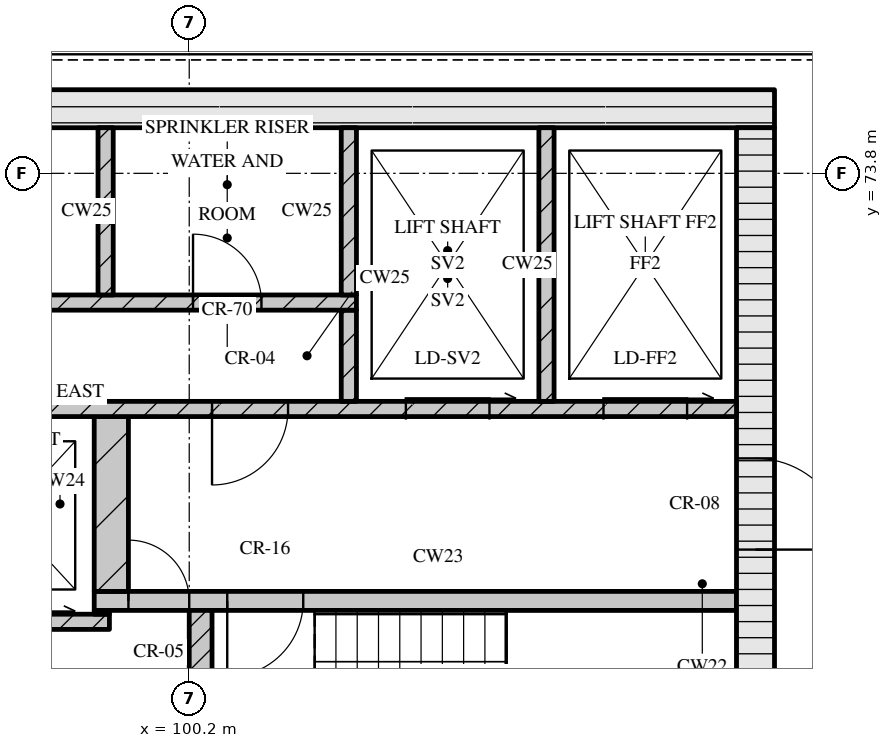
"""IFC4 building model, lengths in metres.
Left out: names, types, materials, properties, quantities, classifications, styles, units other than length and angle.
Written with IfcOpenShell. Run it as: python <this file> out.ifc"""

import sys

from ifc_helpers import new_model, si_unit, direction, frame, frame_2d, origin, place, context, subcontext, project, spatial, rectangle, extrude, element, fill, save


model = new_model("IFC4")
c1 = context("Model", 3, precision=1e-05, world=origin(), true_north=direction((0.0, 1.0)))
c2 = subcontext(c1, "Body", "Model", "MODEL_VIEW")
j1 = project(units=[si_unit("LENGTHUNIT", "METRE"), si_unit("PLANEANGLEUNIT", "RADIAN")], contexts=[c1])
p1 = place(None, origin())
s1 = spatial("IfcSite", under=j1, at=p1, CompositionType="ELEMENT")
p2 = place(p1, origin())
s2 = spatial("IfcBuilding", under=s1, at=p2, CompositionType="ELEMENT")
p3 = place(p2, frame((0.0, 0.0, 263.55)))
s3 = spatial("IfcBuildingStorey", under=s2, at=p3, CompositionType="ELEMENT", Elevation=263.55)
p4 = place(p3, frame((67.3, 74.65, 0.0), z_axis=(0.0, 0.0, 1.0), x_axis=(1.0, 0.0, 0.0)))
e1 = element("IfcWall", 1, at=p4, inside=s3, PredefinedType="SOLIDWALL", context=c2, shape_type="SweptSolid", body=[
    extrude(rectangle(XDim=40.6, YDim=0.5, at=frame_2d((20.3, 0.0))), origin(), (0.0, 0.0, 1.0), 3.32),
])
p5 = place(p3, frame((107.65, 62.4, 0.0), z_axis=(0.0, 0.0, 1.0), x_axis=(0.0, 1.0, 0.0)))
e2 = element("IfcWall", 2, at=p5, inside=s3, PredefinedType="SOLIDWALL", context=c2, shape_type="SweptSolid", body=[
    extrude(rectangle(XDim=12.0, YDim=0.5, at=frame_2d((6.0, 0.0))), origin(), (0.0, 0.0, 1.0), 3.32),
])
p6 = place(p5, frame((6.45, 0.0, 0.0)))
e3 = element("IfcOpeningElement", 3, at=p6, cuts=e2, PredefinedType="OPENING", context=c2, shape_type="SweptSolid", body=[
    extrude(rectangle(XDim=1.2, YDim=2.1, at=frame_2d((0.6, 1.05))), frame((0.0, 0.26, 0.0), z_axis=(0.0, -1.0, 0.0), x_axis=(1.0, 0.0, 0.0)), (0.0, 0.0, 1.0), 0.52),
])
p7 = place(p3, frame((100.35, 65.2, 0.0), z_axis=(0.0, 0.0, 1.0), x_axis=(0.0, 1.0, 0.0)))
e4 = element("IfcWall", 4, at=p7, inside=s3, PredefinedType="SOLIDWALL", context=c2, shape_type="SweptSolid", body=[
    extrude(rectangle(XDim=2.85, YDim=0.3, at=frame_2d((1.425, 0.0))), origin(), (0.0, 0.0, 1.0), 3.32),
])
p8 = place(p3, frame((76.05, 67.9, 0.0), z_axis=(0.0, 0.0, 1.0), x_axis=(1.0, 0.0, 0.0)))
e5 = element("IfcWall", 5, at=p8, inside=s3, PredefinedType="SOLIDWALL", context=c2, shape_type="SweptSolid", body=[
    extrude(rectangle(XDim=23.1, YDim=0.2, at=frame_2d((11.55, 0.0))), origin(), (0.0, 0.0, 1.0), 3.32),
])
p9 = place(p8, frame((1.4, 0.0, 0.0)))
e6 = element("IfcOpeningElement", 6, at=p9, cuts=e5, PredefinedType="OPENING", context=c2, shape_type="SweptSolid", body=[
    extrude(rectangle(XDim=0.9, YDim=2.1, at=frame_2d((0.45, 1.05))), frame((0.0, 0.11, 0.0), z_axis=(0.0, -1.0, 0.0), x_axis=(1.0, 0.0, 0.0)), (0.0, 0.0, 1.0), 0.22),
])
p10 = place(p8, frame((5.11, 0.0, 0.0)))
e7 = element("IfcOpeningElement", 7, at=p10, cuts=e5, PredefinedType="OPENING", context=c2, shape_type="SweptSolid", body=[
    extrude(rectangle(XDim=0.9, YDim=2.1, at=frame_2d((0.45, 1.05))), frame((0.0, 0.11, 0.0), z_axis=(0.0, -1.0, 0.0), x_axis=(1.0, 0.0, 0.0)), (0.0, 0.0, 1.0), 0.22),
])
p11 = place(p8, frame((8.45, 0.0, 0.0)))
e8 = element("IfcOpeningElement", 8, at=p11, cuts=e5, PredefinedType="OPENING", context=c2, shape_type="SweptSolid", body=[
    extrude(rectangle(XDim=0.9, YDim=2.1, at=frame_2d((0.45, 1.05))), frame((0.0, 0.11, 0.0), z_axis=(0.0, -1.0, 0.0), x_axis=(1.0, 0.0, 0.0)), (0.0, 0.0, 1.0), 0.22),
])
p12 = place(p8, frame((10.91, 0.0, 0.0)))
e9 = element("IfcOpeningElement", 9, at=p12, cuts=e5, PredefinedType="OPENING", context=c2, shape_type="SweptSolid", body=[
    extrude(rectangle(XDim=0.9, YDim=2.1, at=frame_2d((0.45, 1.05))), frame((0.0, 0.11, 0.0), z_axis=(0.0, -1.0, 0.0), x_axis=(1.0, 0.0, 0.0)), (0.0, 0.0, 1.0), 0.22),
])
p13 = place(p8, frame((13.55, 0.0, 0.0)))
e10 = element("IfcOpeningElement", 10, at=p13, cuts=e5, PredefinedType="OPENING", context=c2, shape_type="SweptSolid", body=[
    extrude(rectangle(XDim=1.0, YDim=2.1, at=frame_2d((0.5, 1.05))), frame((0.0, 0.11, 0.0), z_axis=(0.0, -1.0, 0.0), x_axis=(1.0, 0.0, 0.0)), (0.0, 0.0, 1.0), 0.22),
])
p14 = place(p8, frame((16.2, 0.0, 0.0)))
e11 = element("IfcOpeningElement", 11, at=p14, cuts=e5, PredefinedType="OPENING", context=c2, shape_type="SweptSolid", body=[
    extrude(rectangle(XDim=1.1, YDim=2.1, at=frame_2d((0.55, 1.05))), frame((0.0, 0.11, 0.0), z_axis=(0.0, -1.0, 0.0), x_axis=(1.0, 0.0, 0.0)), (0.0, 0.0, 1.0), 0.22),
])
p15 = place(p8, frame((18.7, 0.0, 0.0)))
e12 = element("IfcOpeningElement", 12, at=p15, cuts=e5, PredefinedType="OPENING", context=c2, shape_type="SweptSolid", body=[
    extrude(rectangle(XDim=1.1, YDim=2.1, at=frame_2d((0.55, 1.05))), frame((0.0, 0.11, 0.0), z_axis=(0.0, -1.0, 0.0), x_axis=(1.0, 0.0, 0.0)), (0.0, 0.0, 1.0), 0.22),
])
p16 = place(p8, frame((21.2, 0.0, 0.0)))
e13 = element("IfcOpeningElement", 13, at=p16, cuts=e5, PredefinedType="OPENING", context=c2, shape_type="SweptSolid", body=[
    extrude(rectangle(XDim=1.1, YDim=2.1, at=frame_2d((0.55, 1.05))), frame((0.0, 0.11, 0.0), z_axis=(0.0, -1.0, 0.0), x_axis=(1.0, 0.0, 0.0)), (0.0, 0.0, 1.0), 0.22),
])
p17 = place(p3, frame((98.95, 68.025, 0.0), z_axis=(0.0, 0.0, 1.0), x_axis=(1.0, 0.0, 0.0)))
e14 = element("IfcWall", 14, at=p17, inside=s3, PredefinedType="SOLIDWALL", context=c2, shape_type="SweptSolid", body=[
    extrude(rectangle(XDim=0.2, YDim=0.05, at=frame_2d((0.1, 0.0))), origin(), (0.0, 0.0, 1.0), 3.32),
])
p18 = place(p3, frame((98.95, 68.175, 0.0), z_axis=(0.0, 0.0, 1.0), x_axis=(1.0, 0.0, 0.0)))
e15 = element("IfcWall", 15, at=p18, inside=s3, PredefinedType="SOLIDWALL", context=c2, shape_type="SweptSolid", body=[
    extrude(rectangle(XDim=8.45, YDim=0.25, at=frame_2d((4.225, 0.0))), origin(), (0.0, 0.0, 1.0), 3.32),
])
p19 = place(p18, frame((0.45, 0.0, 0.0)))
e16 = element("IfcOpeningElement", 16, at=p19, cuts=e15, PredefinedType="OPENING", context=c2, shape_type="SweptSolid", body=[
    extrude(rectangle(XDim=0.8, YDim=2.1, at=frame_2d((0.4, 1.05))), frame((0.0, 0.135, 0.0), z_axis=(0.0, -1.0, 0.0), x_axis=(1.0, 0.0, 0.0)), (0.0, 0.0, 1.0), 0.27),
])
p20 = place(p18, frame((1.75, 0.0, 0.0)))
e17 = element("IfcOpeningElement", 17, at=p20, cuts=e15, PredefinedType="OPENING", context=c2, shape_type="SweptSolid", body=[
    extrude(rectangle(XDim=1.0, YDim=2.1, at=frame_2d((0.5, 1.05))), frame((0.0, 0.135, 0.0), z_axis=(0.0, -1.0, 0.0), x_axis=(1.0, 0.0, 0.0)), (0.0, 0.0, 1.0), 0.27),
])
p21 = place(p3, frame((99.175, 68.3, 0.0), z_axis=(0.0, 0.0, 1.0), x_axis=(0.0, 1.0, 0.0)))
e18 = element("IfcWall", 18, at=p21, inside=s3, PredefinedType="SOLIDWALL", context=c2, shape_type="SweptSolid", body=[
    extrude(rectangle(XDim=2.3, YDim=0.45, at=frame_2d((1.15, 0.0))), origin(), (0.0, 0.0, 1.0), 3.32),
])
p22 = place(p3, frame((67.8, 70.7, 0.0), z_axis=(0.0, 0.0, 1.0), x_axis=(1.0, 0.0, 0.0)))
e19 = element("IfcWall", 19, at=p22, inside=s3, PredefinedType="SOLIDWALL", context=c2, shape_type="SweptSolid", body=[
    extrude(rectangle(XDim=39.6, YDim=0.2, at=frame_2d((19.8, 0.0))), origin(), (0.0, 0.0, 1.0), 3.32),
])
p23 = place(p22, frame((0.65, 0.0, 0.0)))
e20 = element("IfcOpeningElement", 20, at=p23, cuts=e19, PredefinedType="OPENING", context=c2, shape_type="SweptSolid", body=[
    extrude(rectangle(XDim=1.1, YDim=2.1, at=frame_2d((0.55, 1.05))), frame((0.0, 0.11, 0.0), z_axis=(0.0, -1.0, 0.0), x_axis=(1.0, 0.0, 0.0)), (0.0, 0.0, 1.0), 0.22),
])
p24 = place(p22, frame((3.25, 0.0, 0.0)))
e21 = element("IfcOpeningElement", 21, at=p24, cuts=e19, PredefinedType="OPENING", context=c2, shape_type="SweptSolid", body=[
    extrude(rectangle(XDim=1.1, YDim=2.1, at=frame_2d((0.55, 1.05))), frame((0.0, 0.11, 0.0), z_axis=(0.0, -1.0, 0.0), x_axis=(1.0, 0.0, 0.0)), (0.0, 0.0, 1.0), 0.22),
])
p25 = place(p22, frame((5.9, 0.0, 0.0)))
e22 = element("IfcOpeningElement", 22, at=p25, cuts=e19, PredefinedType="OPENING", context=c2, shape_type="SweptSolid", body=[
    extrude(rectangle(XDim=1.0, YDim=2.1, at=frame_2d((0.5, 1.05))), frame((0.0, 0.11, 0.0), z_axis=(0.0, -1.0, 0.0), x_axis=(1.0, 0.0, 0.0)), (0.0, 0.0, 1.0), 0.22),
])
p26 = place(p22, frame((21.7, 0.0, 0.0)))
e23 = element("IfcOpeningElement", 23, at=p26, cuts=e19, PredefinedType="OPENING", context=c2, shape_type="SweptSolid", body=[
    extrude(rectangle(XDim=1.0, YDim=2.1, at=frame_2d((0.5, 1.05))), frame((0.0, 0.11, 0.0), z_axis=(0.0, -1.0, 0.0), x_axis=(1.0, 0.0, 0.0)), (0.0, 0.0, 1.0), 0.22),
])
p27 = place(p22, frame((32.7, 0.0, 0.0)))
e24 = element("IfcOpeningElement", 24, at=p27, cuts=e19, PredefinedType="OPENING", context=c2, shape_type="SweptSolid", body=[
    extrude(rectangle(XDim=1.0, YDim=2.1, at=frame_2d((0.5, 1.05))), frame((0.0, 0.11, 0.0), z_axis=(0.0, -1.0, 0.0), x_axis=(1.0, 0.0, 0.0)), (0.0, 0.0, 1.0), 0.22),
])
p28 = place(p22, frame((35.25, 0.0, 0.0)))
e25 = element("IfcOpeningElement", 25, at=p28, cuts=e19, PredefinedType="OPENING", context=c2, shape_type="SweptSolid", body=[
    extrude(rectangle(XDim=1.1, YDim=2.1, at=frame_2d((0.55, 1.05))), frame((0.0, 0.11, 0.0), z_axis=(0.0, -1.0, 0.0), x_axis=(1.0, 0.0, 0.0)), (0.0, 0.0, 1.0), 0.22),
])
p29 = place(p22, frame((37.85, 0.0, 0.0)))
e26 = element("IfcOpeningElement", 26, at=p29, cuts=e19, PredefinedType="OPENING", context=c2, shape_type="SweptSolid", body=[
    extrude(rectangle(XDim=1.1, YDim=2.1, at=frame_2d((0.55, 1.05))), frame((0.0, 0.11, 0.0), z_axis=(0.0, -1.0, 0.0), x_axis=(1.0, 0.0, 0.0)), (0.0, 0.0, 1.0), 0.22),
])
p30 = place(p3, frame((102.3, 70.8, 0.0), z_axis=(0.0, 0.0, 1.0), x_axis=(0.0, 1.0, 0.0)))
e27 = element("IfcWall", 27, at=p30, inside=s3, PredefinedType="SOLIDWALL", context=c2, shape_type="SweptSolid", body=[
    extrude(rectangle(XDim=1.2, YDim=0.2, at=frame_2d((0.6, 0.0))), origin(), (0.0, 0.0, 1.0), 3.32),
])
p31 = place(p3, frame((104.9, 70.8, 0.0), z_axis=(0.0, 0.0, 1.0), x_axis=(0.0, 1.0, 0.0)))
e28 = element("IfcWall", 28, at=p31, inside=s3, PredefinedType="SOLIDWALL", context=c2, shape_type="SweptSolid", body=[
    extrude(rectangle(XDim=3.6, YDim=0.2, at=frame_2d((1.8, 0.0))), origin(), (0.0, 0.0, 1.0), 3.32),
])
p32 = place(p3, frame((93.28, 72.1, 0.0), z_axis=(0.0, 0.0, 1.0), x_axis=(1.0, 0.0, 0.0)))
e29 = element("IfcWall", 29, at=p32, inside=s3, PredefinedType="SOLIDWALL", context=c2, shape_type="SweptSolid", body=[
    extrude(rectangle(XDim=9.12, YDim=0.2, at=frame_2d((4.56, 0.0))), origin(), (0.0, 0.0, 1.0), 3.32),
])
p33 = place(p32, frame((0.87, 0.0, 0.0)))
e30 = element("IfcOpeningElement", 30, at=p33, cuts=e29, PredefinedType="OPENING", context=c2, shape_type="SweptSolid", body=[
    extrude(rectangle(XDim=0.9, YDim=2.1, at=frame_2d((0.45, 1.05))), frame((0.0, 0.11, 0.0), z_axis=(0.0, -1.0, 0.0), x_axis=(1.0, 0.0, 0.0)), (0.0, 0.0, 1.0), 0.22),
])
p34 = place(p32, frame((3.73, 0.0, 0.0)))
e31 = element("IfcOpeningElement", 31, at=p34, cuts=e29, PredefinedType="OPENING", context=c2, shape_type="SweptSolid", body=[
    extrude(rectangle(XDim=0.9, YDim=2.1, at=frame_2d((0.45, 1.05))), frame((0.0, 0.11, 0.0), z_axis=(0.0, -1.0, 0.0), x_axis=(1.0, 0.0, 0.0)), (0.0, 0.0, 1.0), 0.22),
])
p35 = place(p32, frame((6.97, 0.0, 0.0)))
e32 = element("IfcOpeningElement", 32, at=p35, cuts=e29, PredefinedType="OPENING", context=c2, shape_type="SweptSolid", body=[
    extrude(rectangle(XDim=0.9, YDim=2.1, at=frame_2d((0.45, 1.05))), frame((0.0, 0.11, 0.0), z_axis=(0.0, -1.0, 0.0), x_axis=(1.0, 0.0, 0.0)), (0.0, 0.0, 1.0), 0.22),
])
for number, where, z_axis, x_axis in (
    (33, (99.1, 72.2, 0.0), (0.0, 0.0, 1.0), (0.0, 1.0, 0.0)),
    (34, (102.3, 72.2, 0.0), (0.0, 0.0, 1.0), (0.0, 1.0, 0.0)),
):
    element("IfcWall", number, at=place(p3, frame(where, z_axis=z_axis, x_axis=x_axis)), inside=s3, PredefinedType="SOLIDWALL", context=c2, shape_type="SweptSolid", body=[
        extrude(rectangle(XDim=2.2, YDim=0.2, at=frame_2d((1.1, 0.0))), origin(), (0.0, 0.0, 1.0), 3.32),
    ])
p36 = place(p19, origin())
e35 = element("IfcDoor", 35, at=p36, inside=s3, OperationType="SINGLE_SWING_LEFT", PredefinedType="DOOR", context=c2, shape_type="SweptSolid", body=[
    extrude(rectangle(XDim=0.8, YDim=2.1, at=frame_2d((0.4, 1.05))), frame((0.0, 0.025, 0.0), z_axis=(0.0, -1.0, 0.0), x_axis=(1.0, 0.0, 0.0)), (0.0, 0.0, 1.0), 0.05),
])
fill(e16, e35)
p37 = place(p20, origin())
e36 = element("IfcDoor", 36, at=p37, inside=s3, OperationType="SINGLE_SWING_RIGHT", PredefinedType="DOOR", context=c2, shape_type="SweptSolid", body=[
    extrude(rectangle(XDim=1.0, YDim=2.1, at=frame_2d((0.5, 1.05))), frame((0.0, 0.025, 0.0), z_axis=(0.0, -1.0, 0.0), x_axis=(1.0, 0.0, 0.0)), (0.0, 0.0, 1.0), 0.05),
])
fill(e17, e36)
p38 = place(p6, origin())
e37 = element("IfcDoor", 37, at=p38, inside=s3, OperationType="SINGLE_SWING_RIGHT", PredefinedType="DOOR", context=c2, shape_type="SweptSolid", body=[
    extrude(rectangle(XDim=1.2, YDim=2.1, at=frame_2d((0.6, 1.05))), frame((0.0, 0.025, 0.0), z_axis=(0.0, -1.0, 0.0), x_axis=(1.0, 0.0, 0.0)), (0.0, 0.0, 1.0), 0.05),
])
fill(e3, e37)
p39 = place(p27, origin())
e38 = element("IfcDoor", 38, at=p39, inside=s3, OperationType="SINGLE_SWING_RIGHT", PredefinedType="DOOR", context=c2, shape_type="SweptSolid", body=[
    extrude(rectangle(XDim=1.0, YDim=2.1, at=frame_2d((0.5, 1.05))), frame((0.0, 0.025, 0.0), z_axis=(0.0, -1.0, 0.0), x_axis=(1.0, 0.0, 0.0)), (0.0, 0.0, 1.0), 0.05),
])
fill(e24, e38)
p40 = place(p28, origin())
e39 = element("IfcDoor", 39, at=p40, inside=s3, OperationType="SLIDING_TO_RIGHT", PredefinedType="DOOR", context=c2, shape_type="SweptSolid", body=[
    extrude(rectangle(XDim=1.1, YDim=2.1, at=frame_2d((0.55, 1.05))), frame((0.0, 0.025, 0.0), z_axis=(0.0, -1.0, 0.0), x_axis=(1.0, 0.0, 0.0)), (0.0, 0.0, 1.0), 0.05),
])
fill(e25, e39)
p41 = place(p29, origin())
e40 = element("IfcDoor", 40, at=p41, inside=s3, OperationType="SLIDING_TO_RIGHT", PredefinedType="DOOR", context=c2, shape_type="SweptSolid", body=[
    extrude(rectangle(XDim=1.1, YDim=2.1, at=frame_2d((0.55, 1.05))), frame((0.0, 0.025, 0.0), z_axis=(0.0, -1.0, 0.0), x_axis=(1.0, 0.0, 0.0)), (0.0, 0.0, 1.0), 0.05),
])
fill(e26, e40)
p42 = place(p35, origin())
e41 = element("IfcDoor", 41, at=p42, inside=s3, OperationType="SINGLE_SWING_LEFT", PredefinedType="DOOR", context=c2, shape_type="SweptSolid", body=[
    extrude(rectangle(XDim=0.9, YDim=2.1, at=frame_2d((0.45, 1.05))), frame((0.0, 0.025, 0.0), z_axis=(0.0, -1.0, 0.0), x_axis=(1.0, 0.0, 0.0)), (0.0, 0.0, 1.0), 0.05),
])
fill(e32, e41)
save(model, sys.argv[1])
